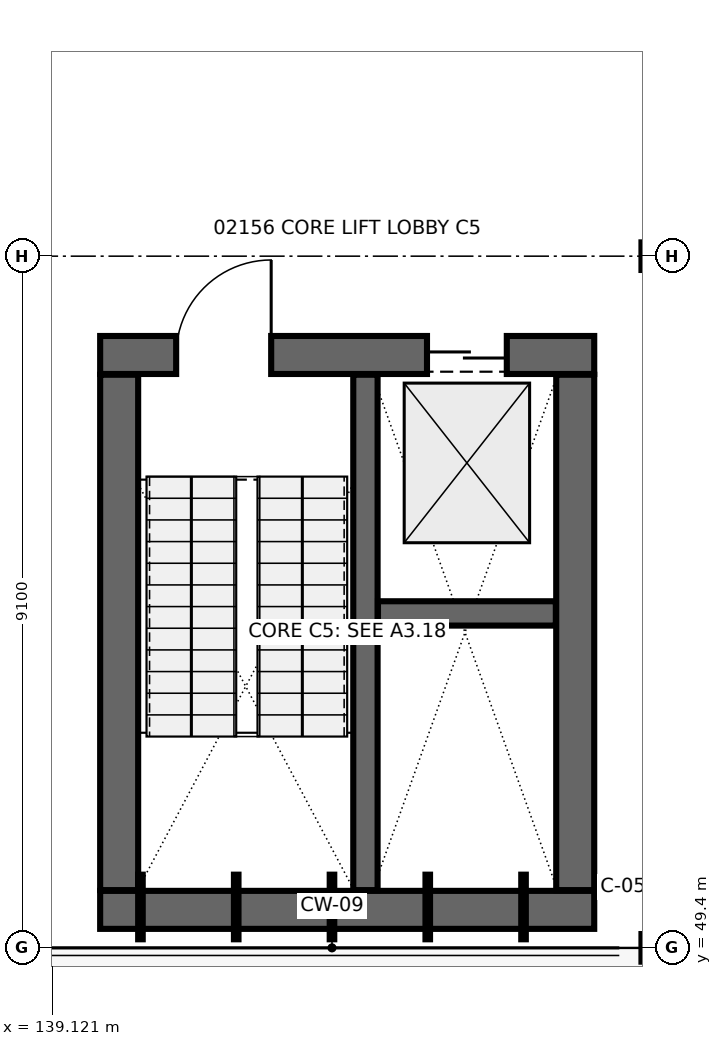
"""IFC4 building model, lengths in metres.
Left out: names, types, materials, properties, quantities, classifications, styles, units other than length and angle.
Written with IfcOpenShell. Run it as: python <this file> out.ifc"""

import sys

from ifc_helpers import new_model, si_unit, direction, frame, frame_2d, origin, origin_2d, place, context, subcontext, project, spatial, rectangle, i_section, extrude, element, fill, save


model = new_model("IFC4")
c1 = context("Model", 3, precision=1e-05, world=origin(), true_north=direction((0.0, 1.0)))
c2 = subcontext(c1, "Body", "Model", "MODEL_VIEW")
j1 = project(units=[si_unit("LENGTHUNIT", "METRE"), si_unit("PLANEANGLEUNIT", "RADIAN")], contexts=[c1])
p1 = place(None, origin())
s1 = spatial("IfcSite", under=j1, at=p1, CompositionType="ELEMENT")
p2 = place(p1, origin())
s2 = spatial("IfcBuilding", under=s1, at=p2, CompositionType="ELEMENT")
p3 = place(p2, frame((0.0, 0.0, 9.6)))
s3 = spatial("IfcBuildingStorey", under=s2, at=p3, CompositionType="ELEMENT", Elevation=9.6)
for number, where, z_axis, x_axis in (
    (1, (147.0, 49.4, 0.0), (0.0, 0.0, 1.0), (1.0, 0.0, 0.0)),
    (2, (147.0, 58.5, 0.0), (0.0, 0.0, 1.0), (1.0, 0.0, 0.0)),
):
    element("IfcColumn", number, at=place(p3, frame(where, z_axis=z_axis, x_axis=x_axis)), inside=s3, PredefinedType="COLUMN", context=c2, shape_type="SweptSolid", body=[
        extrude(i_section(OverallWidth=0.257, OverallDepth=0.363, WebThickness=0.013, FlangeThickness=0.022, at=origin_2d()), origin(), (0.0, 0.0, 1.0), 4.2),
    ])
p4 = place(p3, frame((139.75, 49.9, 0.0), z_axis=(0.0, 0.0, 1.0), x_axis=(1.0, 0.0, 0.0)))
e3 = element("IfcWall", 3, at=p4, inside=s3, PredefinedType="SHEAR", context=c2, shape_type="SweptSolid", body=[
    extrude(rectangle(XDim=6.5, YDim=0.5, at=frame_2d((3.25, 0.0))), origin(), (0.0, 0.0, 1.0), 3.92),
])
p5 = place(p3, frame((139.75, 57.2, 0.0), z_axis=(0.0, 0.0, 1.0), x_axis=(1.0, 0.0, 0.0)))
e4 = element("IfcWall", 4, at=p5, inside=s3, PredefinedType="SHEAR", context=c2, shape_type="SweptSolid", body=[
    extrude(rectangle(XDim=6.5, YDim=0.5, at=frame_2d((3.25, 0.0))), origin(), (0.0, 0.0, 1.0), 3.92),
])
p6 = place(p5, frame((1.0, 0.0, 0.0)))
e5 = element("IfcOpeningElement", 5, at=p6, cuts=e4, PredefinedType="OPENING", context=c2, shape_type="SweptSolid", body=[
    extrude(rectangle(XDim=1.25, YDim=2.2, at=frame_2d((0.625, 1.1))), frame((0.0, 0.26, 0.0), z_axis=(0.0, -1.0, 0.0), x_axis=(1.0, 0.0, 0.0)), (0.0, 0.0, 1.0), 0.52),
])
p7 = place(p5, frame((4.3, 0.0, 0.0)))
e6 = element("IfcOpeningElement", 6, at=p7, cuts=e4, PredefinedType="OPENING", context=c2, shape_type="SweptSolid", body=[
    extrude(rectangle(XDim=1.05, YDim=2.15, at=frame_2d((0.525, 1.075))), frame((0.0, 0.26, 0.0), z_axis=(0.0, -1.0, 0.0), x_axis=(1.0, 0.0, 0.0)), (0.0, 0.0, 1.0), 0.52),
])
for number, where, z_axis, x_axis in (
    (7, (140.0, 50.16, 0.0), (0.0, 0.0, 1.0), (0.0, 1.0, 0.0)),
    (8, (146.0, 50.16, 0.0), (0.0, 0.0, 1.0), (0.0, 1.0, 0.0)),
):
    element("IfcWall", number, at=place(p3, frame(where, z_axis=z_axis, x_axis=x_axis)), inside=s3, PredefinedType="SHEAR", context=c2, shape_type="SweptSolid", body=[
        extrude(rectangle(XDim=6.78, YDim=0.5, at=frame_2d((3.39, 0.0))), origin(), (0.0, 0.0, 1.0), 3.92),
    ])
p8 = place(p3, frame((143.24, 50.16, 0.0), z_axis=(0.0, 0.0, 1.0), x_axis=(0.0, 1.0, 0.0)))
e9 = element("IfcWall", 9, at=p8, inside=s3, PredefinedType="SHEAR", context=c2, shape_type="SweptSolid", body=[
    extrude(rectangle(XDim=6.78, YDim=0.32, at=frame_2d((3.39, 0.0))), origin(), (0.0, 0.0, 1.0), 3.92),
])
p9 = place(p3, frame((143.405, 53.8, 0.0), z_axis=(0.0, 0.0, 1.0), x_axis=(1.0, 0.0, 0.0)))
e10 = element("IfcWall", 10, at=p9, inside=s3, PredefinedType="SHEAR", context=c2, shape_type="SweptSolid", body=[
    extrude(rectangle(XDim=2.34, YDim=0.32, at=frame_2d((1.17, 0.0))), origin(), (0.0, 0.0, 1.0), 3.92),
])
p10 = place(p6, origin())
e11 = element("IfcDoor", 11, at=p10, inside=s3, OperationType="SINGLE_SWING_RIGHT", PredefinedType="DOOR", context=c2, shape_type="SweptSolid", body=[
    extrude(rectangle(XDim=1.25, YDim=2.2, at=frame_2d((0.625, 1.1))), frame((0.0, 0.025, 0.0), z_axis=(0.0, -1.0, 0.0), x_axis=(1.0, 0.0, 0.0)), (0.0, 0.0, 1.0), 0.05),
])
fill(e5, e11)
p11 = place(p7, origin())
e12 = element("IfcDoor", 12, at=p11, inside=s3, OperationType="DOUBLE_DOOR_SLIDING", PredefinedType="DOOR", context=c2, shape_type="SweptSolid", body=[
    extrude(rectangle(XDim=1.05, YDim=2.15, at=frame_2d((0.525, 1.075))), frame((0.0, 0.025, 0.0), z_axis=(0.0, -1.0, 0.0), x_axis=(1.0, 0.0, 0.0)), (0.0, 0.0, 1.0), 0.05),
])
fill(e6, e12)
save(model, sys.argv[1])
